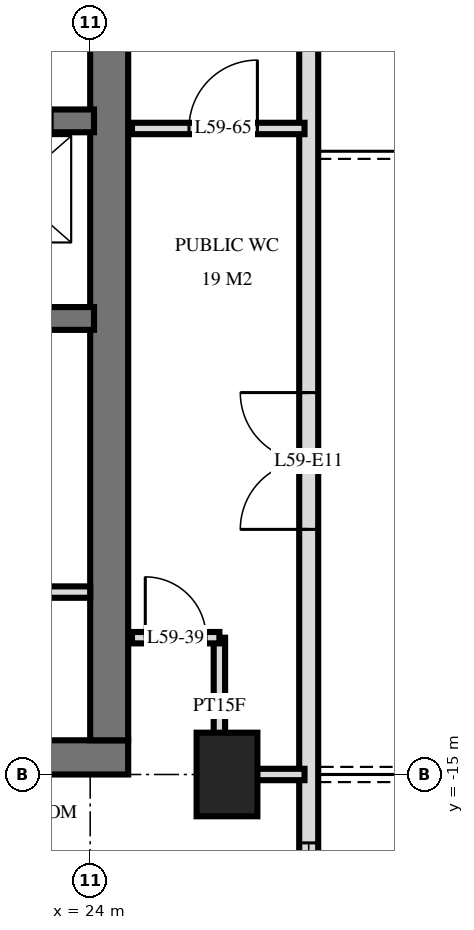
"""IFC4 building model, lengths in metres.
Left out: names, types, materials, properties, quantities, classifications, styles, units other than length and angle.
Written with IfcOpenShell. Run it as: python <this file> out.ifc"""

import sys

from ifc_helpers import new_model, si_unit, direction, frame, frame_2d, origin, origin_2d, place, context, subcontext, project, spatial, rectangle, extrude, element, fill, save


model = new_model("IFC4")
c1 = context("Model", 3, precision=1e-05, world=origin(), true_north=direction((0.0, 1.0)))
c2 = subcontext(c1, "Body", "Model", "MODEL_VIEW")
j1 = project(units=[si_unit("LENGTHUNIT", "METRE"), si_unit("PLANEANGLEUNIT", "RADIAN")], contexts=[c1])
p1 = place(None, origin())
s1 = spatial("IfcSite", under=j1, at=p1, CompositionType="ELEMENT")
p2 = place(p1, origin())
s2 = spatial("IfcBuilding", under=s1, at=p2, CompositionType="ELEMENT")
p3 = place(p2, frame((0.0, 0.0, 225.6)))
s3 = spatial("IfcBuildingStorey", under=s2, at=p3, CompositionType="ELEMENT", Elevation=225.6)
p4 = place(p3, frame((25.8, -15.0, 0.0), z_axis=(0.0, 0.0, 1.0), x_axis=(0.0, 1.0, 0.0)))
e1 = element("IfcColumn", 1, at=p4, inside=s3, PredefinedType="COLUMN", context=c2, shape_type="SweptSolid", body=[
    extrude(rectangle(XDim=1.1, YDim=0.8, at=origin_2d()), origin(), (0.0, 0.0, 1.0), 3.5),
])
p5 = place(p3, frame((10.0, -14.775, 0.0), z_axis=(0.0, 0.0, 1.0), x_axis=(1.0, 0.0, 0.0)))
e2 = element("IfcWall", 2, at=p5, inside=s3, PredefinedType="SHEAR", context=c2, shape_type="SweptSolid", body=[
    extrude(rectangle(XDim=14.5, YDim=0.45, at=frame_2d((7.25, 0.0))), origin(), (0.0, 0.0, 1.0), 3.5),
])
p6 = place(p5, frame((7.1, 0.0, 0.0)))
e3 = element("IfcOpeningElement", 3, at=p6, cuts=e2, PredefinedType="OPENING", context=c2, shape_type="SweptSolid", body=[
    extrude(rectangle(XDim=1.2, YDim=2.1, at=frame_2d((0.6, 1.05))), frame((0.0, 0.235, 0.0), z_axis=(0.0, -1.0, 0.0), x_axis=(1.0, 0.0, 0.0)), (0.0, 0.0, 1.0), 0.47),
])
p7 = place(p5, frame((4.15, 0.0, 0.0)))
e4 = element("IfcOpeningElement", 4, at=p7, cuts=e2, PredefinedType="OPENING", context=c2, shape_type="SweptSolid", body=[
    extrude(rectangle(XDim=1.1, YDim=2.1, at=frame_2d((0.55, 1.05))), frame((0.0, 0.235, 0.0), z_axis=(0.0, -1.0, 0.0), x_axis=(1.0, 0.0, 0.0)), (0.0, 0.0, 1.0), 0.47),
])
p8 = place(p5, frame((10.1, 0.0, 0.0)))
e5 = element("IfcOpeningElement", 5, at=p8, cuts=e2, PredefinedType="OPENING", context=c2, shape_type="SweptSolid", body=[
    extrude(rectangle(XDim=0.9, YDim=2.1, at=frame_2d((0.45, 1.05))), frame((0.0, 0.235, 0.0), z_axis=(0.0, -1.0, 0.0), x_axis=(1.0, 0.0, 0.0)), (0.0, 0.0, 1.0), 0.47),
])
p9 = place(p5, frame((12.45, 0.0, 0.0)))
e6 = element("IfcOpeningElement", 6, at=p9, cuts=e2, PredefinedType="OPENING", context=c2, shape_type="SweptSolid", body=[
    extrude(rectangle(XDim=1.0, YDim=2.1, at=frame_2d((0.5, 1.05))), frame((0.0, 0.235, 0.0), z_axis=(0.0, -1.0, 0.0), x_axis=(1.0, 0.0, 0.0)), (0.0, 0.0, 1.0), 0.47),
])
p10 = place(p3, frame((24.25, -14.55, 0.0), z_axis=(0.0, 0.0, 1.0), x_axis=(0.0, 1.0, 0.0)))
e7 = element("IfcWall", 7, at=p10, inside=s3, PredefinedType="SHEAR", context=c2, shape_type="SweptSolid", body=[
    extrude(rectangle(XDim=14.1, YDim=0.5, at=frame_2d((7.05, 0.0))), origin(), (0.0, 0.0, 1.0), 3.5),
])
p11 = place(p3, frame((10.35, -6.4, 0.0), z_axis=(0.0, 0.0, 1.0), x_axis=(1.0, 0.0, 0.0)))
e8 = element("IfcWall", 8, at=p11, inside=s3, PredefinedType="SHEAR", context=c2, shape_type="SweptSolid", body=[
    extrude(rectangle(XDim=13.7, YDim=0.3, at=frame_2d((6.85, 0.0))), origin(), (0.0, 0.0, 1.0), 3.5),
])
p12 = place(p11, frame((12.05, 0.0, 0.0)))
e9 = element("IfcOpeningElement", 9, at=p12, cuts=e8, PredefinedType="OPENING", context=c2, shape_type="SweptSolid", body=[
    extrude(rectangle(XDim=1.1, YDim=2.1, at=frame_2d((0.55, 1.05))), frame((0.0, 0.16, 0.0), z_axis=(0.0, -1.0, 0.0), x_axis=(1.0, 0.0, 0.0)), (0.0, 0.0, 1.0), 0.32),
])
p13 = place(p11, frame((6.8, 0.0, 0.0)))
e10 = element("IfcOpeningElement", 10, at=p13, cuts=e8, PredefinedType="OPENING", context=c2, shape_type="SweptSolid", body=[
    extrude(rectangle(XDim=1.1, YDim=2.1, at=frame_2d((0.55, 1.05))), frame((0.0, 0.16, 0.0), z_axis=(0.0, -1.0, 0.0), x_axis=(1.0, 0.0, 0.0)), (0.0, 0.0, 1.0), 0.32),
])
p14 = place(p3, frame((10.35, -9.0, 0.0), z_axis=(0.0, 0.0, 1.0), x_axis=(1.0, 0.0, 0.0)))
e11 = element("IfcWall", 11, at=p14, inside=s3, PredefinedType="SHEAR", context=c2, shape_type="SweptSolid", body=[
    extrude(rectangle(XDim=13.7, YDim=0.3, at=frame_2d((6.85, 0.0))), origin(), (0.0, 0.0, 1.0), 3.5),
])
p15 = place(p14, frame((3.8, 0.0, 0.0)))
e12 = element("IfcOpeningElement", 12, at=p15, cuts=e11, PredefinedType="OPENING", context=c2, shape_type="SweptSolid", body=[
    extrude(rectangle(XDim=1.1, YDim=2.1, at=frame_2d((0.55, 1.05))), frame((0.0, 0.16, 0.0), z_axis=(0.0, -1.0, 0.0), x_axis=(1.0, 0.0, 0.0)), (0.0, 0.0, 1.0), 0.32),
])
p16 = place(p3, frame((26.875, -24.875, 0.0), z_axis=(0.0, 0.0, 1.0), x_axis=(0.0, 1.0, 0.0)))
e13 = element("IfcWall", 13, at=p16, inside=s3, PredefinedType="SOLIDWALL", context=c2, shape_type="SweptSolid", body=[
    extrude(rectangle(XDim=21.551, YDim=0.25, at=frame_2d((10.775, 0.0))), origin(), (0.0, 0.0, 1.0), 3.22),
])
p17 = place(p16, frame((0.575, 0.0, 0.0)))
e14 = element("IfcOpeningElement", 14, at=p17, cuts=e13, PredefinedType="OPENING", context=c2, shape_type="SweptSolid", body=[
    extrude(rectangle(XDim=1.8, YDim=2.4, at=frame_2d((0.9, 1.2))), frame((0.0, 0.135, 0.0), z_axis=(0.0, -1.0, 0.0), x_axis=(1.0, 0.0, 0.0)), (0.0, 0.0, 1.0), 0.27),
])
p18 = place(p16, frame((4.475, 0.0, 0.0)))
e15 = element("IfcOpeningElement", 15, at=p18, cuts=e13, PredefinedType="OPENING", context=c2, shape_type="SweptSolid", body=[
    extrude(rectangle(XDim=1.8, YDim=2.4, at=frame_2d((0.9, 1.2))), frame((0.0, 0.135, 0.0), z_axis=(0.0, -1.0, 0.0), x_axis=(1.0, 0.0, 0.0)), (0.0, 0.0, 1.0), 0.27),
])
p19 = place(p16, frame((7.775, 0.0, 0.9)))
e16 = element("IfcOpeningElement", 16, at=p19, cuts=e13, PredefinedType="OPENING", context=c2, shape_type="SweptSolid", body=[
    extrude(rectangle(XDim=1.2, YDim=1.5, at=frame_2d((0.6, 0.75))), frame((0.0, 0.135, 0.0), z_axis=(0.0, -1.0, 0.0), x_axis=(1.0, 0.0, 0.0)), (0.0, 0.0, 1.0), 0.27),
])
p20 = place(p16, frame((13.1, 0.0, 0.0)))
e17 = element("IfcOpeningElement", 17, at=p20, cuts=e13, PredefinedType="OPENING", context=c2, shape_type="SweptSolid", body=[
    extrude(rectangle(XDim=1.8, YDim=2.4, at=frame_2d((0.9, 1.2))), frame((0.0, 0.135, 0.0), z_axis=(0.0, -1.0, 0.0), x_axis=(1.0, 0.0, 0.0)), (0.0, 0.0, 1.0), 0.27),
])
p21 = place(p3, frame((21.9, -12.6, 0.0), z_axis=(0.0, 0.0, 1.0), x_axis=(1.0, 0.0, 0.0)))
e18 = element("IfcWall", 18, at=p21, inside=s3, PredefinedType="PARTITIONING", context=c2, shape_type="SweptSolid", body=[
    extrude(rectangle(XDim=2.1, YDim=0.15, at=frame_2d((1.05, 0.0))), origin(), (0.0, 0.0, 1.0), 3.2),
])
p22 = place(p21, frame((0.55, 0.0, 0.0)))
e19 = element("IfcOpeningElement", 19, at=p22, cuts=e18, PredefinedType="OPENING", context=c2, shape_type="SweptSolid", body=[
    extrude(rectangle(XDim=1.0, YDim=2.1, at=frame_2d((0.5, 1.05))), frame((0.0, 0.085, 0.0), z_axis=(0.0, -1.0, 0.0), x_axis=(1.0, 0.0, 0.0)), (0.0, 0.0, 1.0), 0.17),
])
p23 = place(p3, frame((25.7, -15.0, 0.0), z_axis=(0.0, 0.0, 1.0), x_axis=(0.0, 1.0, 0.0)))
e20 = element("IfcWall", 20, at=p23, inside=s3, PredefinedType="PARTITIONING", context=c2, shape_type="SweptSolid", body=[
    extrude(rectangle(XDim=1.8, YDim=0.15, at=frame_2d((0.9, 0.0))), origin(), (0.0, 0.0, 1.0), 3.22),
])
p24 = place(p3, frame((25.7, -15.0, 0.0), z_axis=(0.0, 0.0, 1.0), x_axis=(1.0, 0.0, 0.0)))
e21 = element("IfcWall", 21, at=p24, inside=s3, PredefinedType="PARTITIONING", context=c2, shape_type="SweptSolid", body=[
    extrude(rectangle(XDim=1.12, YDim=0.15, at=frame_2d((0.56, 0.0))), origin(), (0.0, 0.0, 1.0), 3.22),
])
p25 = place(p3, frame((24.55, -13.2, 0.0), z_axis=(0.0, 0.0, 1.0), x_axis=(1.0, 0.0, 0.0)))
e22 = element("IfcWall", 22, at=p25, inside=s3, PredefinedType="PARTITIONING", context=c2, shape_type="SweptSolid", body=[
    extrude(rectangle(XDim=1.15, YDim=0.15, at=frame_2d((0.575, 0.0))), origin(), (0.0, 0.0, 1.0), 3.22),
])
p26 = place(p25, frame((0.175, 0.0, 0.0)))
e23 = element("IfcOpeningElement", 23, at=p26, cuts=e22, PredefinedType="OPENING", context=c2, shape_type="SweptSolid", body=[
    extrude(rectangle(XDim=0.8, YDim=2.1, at=frame_2d((0.4, 1.05))), frame((0.0, 0.085, 0.0), z_axis=(0.0, -1.0, 0.0), x_axis=(1.0, 0.0, 0.0)), (0.0, 0.0, 1.0), 0.17),
])
p27 = place(p3, frame((24.55, -6.5, 0.0), z_axis=(0.0, 0.0, 1.0), x_axis=(1.0, 0.0, 0.0)))
e24 = element("IfcWall", 24, at=p27, inside=s3, PredefinedType="PLUMBINGWALL", context=c2, shape_type="SweptSolid", body=[
    extrude(rectangle(XDim=2.27, YDim=0.15, at=frame_2d((1.135, 0.0))), origin(), (0.0, 0.0, 1.0), 3.22),
])
p28 = place(p27, frame((0.75, 0.0, 0.0)))
e25 = element("IfcOpeningElement", 25, at=p28, cuts=e24, PredefinedType="OPENING", context=c2, shape_type="SweptSolid", body=[
    extrude(rectangle(XDim=0.9, YDim=2.1, at=frame_2d((0.45, 1.05))), frame((0.0, 0.085, 0.0), z_axis=(0.0, -1.0, 0.0), x_axis=(1.0, 0.0, 0.0)), (0.0, 0.0, 1.0), 0.17),
])
p29 = place(p19, origin())
e26 = element("IfcWindow", 26, at=p29, inside=s3, PartitioningType="SINGLE_PANEL", PredefinedType="WINDOW", context=c2, shape_type="SweptSolid", body=[
    extrude(rectangle(XDim=1.2, YDim=1.5, at=frame_2d((0.6, 0.75))), frame((0.0, 0.03, 0.0), z_axis=(0.0, -1.0, 0.0), x_axis=(1.0, 0.0, 0.0)), (0.0, 0.0, 1.0), 0.06),
])
fill(e16, e26)
p30 = place(p20, origin())
e27 = element("IfcDoor", 27, at=p30, inside=s3, OperationType="DOUBLE_DOOR_SINGLE_SWING", PredefinedType="DOOR", context=c2, shape_type="SweptSolid", body=[
    extrude(rectangle(XDim=1.8, YDim=2.4, at=frame_2d((0.9, 1.2))), frame((0.0, 0.025, 0.0), z_axis=(0.0, -1.0, 0.0), x_axis=(1.0, 0.0, 0.0)), (0.0, 0.0, 1.0), 0.05),
])
fill(e17, e27)
p31 = place(p12, origin())
e28 = element("IfcDoor", 28, at=p31, inside=s3, OperationType="DOUBLE_DOOR_SLIDING", PredefinedType="USERDEFINED", context=c2, shape_type="SweptSolid", body=[
    extrude(rectangle(XDim=1.1, YDim=2.1, at=frame_2d((0.55, 1.05))), frame((0.0, 0.025, 0.0), z_axis=(0.0, -1.0, 0.0), x_axis=(1.0, 0.0, 0.0)), (0.0, 0.0, 1.0), 0.05),
])
fill(e9, e28)
p32 = place(p26, origin())
e29 = element("IfcDoor", 29, at=p32, inside=s3, OperationType="SINGLE_SWING_RIGHT", PredefinedType="DOOR", context=c2, shape_type="SweptSolid", body=[
    extrude(rectangle(XDim=0.8, YDim=2.1, at=frame_2d((0.4, 1.05))), frame((0.0, 0.025, 0.0), z_axis=(0.0, -1.0, 0.0), x_axis=(1.0, 0.0, 0.0)), (0.0, 0.0, 1.0), 0.05),
])
fill(e23, e29)
p33 = place(p28, origin())
e30 = element("IfcDoor", 30, at=p33, inside=s3, OperationType="SINGLE_SWING_LEFT", PredefinedType="DOOR", context=c2, shape_type="SweptSolid", body=[
    extrude(rectangle(XDim=0.9, YDim=2.1, at=frame_2d((0.45, 1.05))), frame((0.0, 0.025, 0.0), z_axis=(0.0, -1.0, 0.0), x_axis=(1.0, 0.0, 0.0)), (0.0, 0.0, 1.0), 0.05),
])
fill(e25, e30)
save(model, sys.argv[1])
